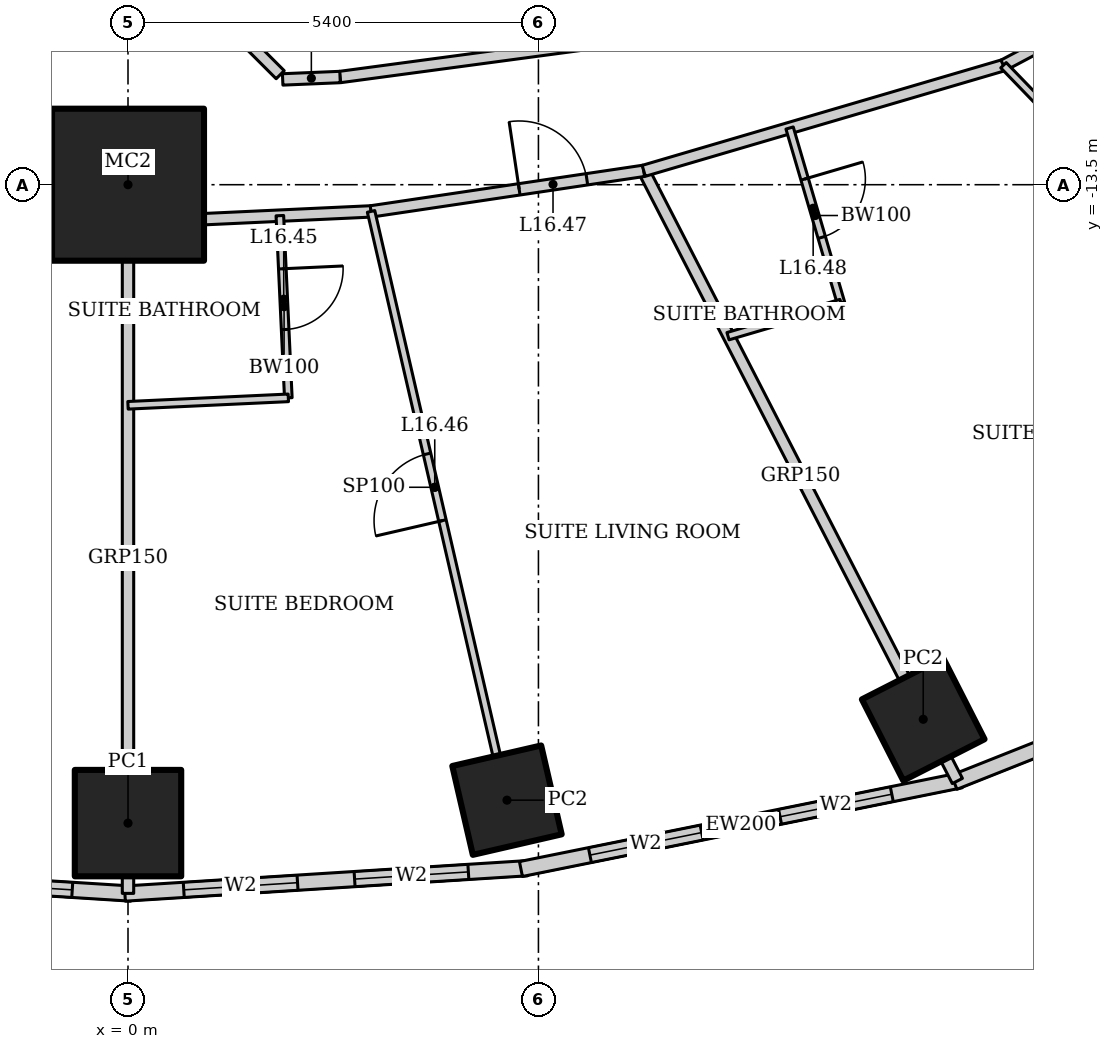
"""IFC4 building model, lengths in metres.
Left out: names, types, materials, properties, quantities, classifications, styles, units other than length and angle.
Written with IfcOpenShell. Run it as: python <this file> out.ifc"""

import sys

from ifc_helpers import new_model, si_unit, direction, frame, frame_2d, origin, origin_2d, place, context, subcontext, project, spatial, rectangle, hollow_rectangle, extrude, element, fill, save


model = new_model("IFC4")
c1 = context("Model", 3, precision=1e-05, world=origin(), true_north=direction((0.0, 1.0)))
c2 = subcontext(c1, "Body", "Model", "MODEL_VIEW")
j1 = project(units=[si_unit("LENGTHUNIT", "METRE"), si_unit("PLANEANGLEUNIT", "RADIAN")], contexts=[c1])
p1 = place(None, origin())
s1 = spatial("IfcSite", under=j1, at=p1, CompositionType="ELEMENT")
p2 = place(p1, origin())
s2 = spatial("IfcBuilding", under=s1, at=p2, CompositionType="ELEMENT")
p3 = place(p2, frame((0.0, 0.0, 73.0)))
s3 = spatial("IfcBuildingStorey", under=s2, at=p3, CompositionType="ELEMENT", Elevation=73.0)
p4 = place(p3, frame((0.0, -13.5, 0.0), z_axis=(0.0, 0.0, 1.0), x_axis=(1.0, 0.0, 0.0)))
e1 = element("IfcColumn", 1, at=p4, inside=s3, PredefinedType="COLUMN", context=c2, shape_type="SweptSolid", body=[
    extrude(hollow_rectangle(XDim=2.0, YDim=2.0, WallThickness=0.17, at=origin_2d()), origin(), (0.0, 0.0, 1.0), 3.6),
])
p5 = place(p3, frame((0.0, -21.9, 0.0), z_axis=(0.0, 0.0, 1.0), x_axis=(1.0, 0.0, 0.0)))
e2 = element("IfcColumn", 2, at=p5, inside=s3, PredefinedType="COLUMN", context=c2, shape_type="SweptSolid", body=[
    extrude(hollow_rectangle(XDim=1.4, YDim=1.4, WallThickness=0.1, at=origin_2d()), origin(), (0.0, 0.0, 1.0), 3.6),
])
for number, where, z_axis, x_axis in (
    (3, (4.986, -21.598, 0.0), (0.0, 0.0, 1.0), (0.974, 0.225, 0.0)),
    (4, (10.463, -20.534, 0.0), (0.0, 0.0, 1.0), (0.891, 0.454, 0.0)),
):
    element("IfcColumn", number, at=place(p3, frame(where, z_axis=z_axis, x_axis=x_axis)), inside=s3, PredefinedType="COLUMN", context=c2, shape_type="SweptSolid", body=[
        extrude(hollow_rectangle(XDim=1.2, YDim=1.2, WallThickness=0.1, at=origin_2d()), origin(), (0.0, 0.0, 1.0), 3.6),
    ])
p6 = place(p3, frame((-5.253, -22.493, 0.0), z_axis=(0.0, 0.0, 1.0), x_axis=(0.998018582375, -0.062919863585, 0.0)))
e5 = element("IfcWall", 5, at=p6, inside=s3, PredefinedType="SOLIDWALL", context=c2, shape_type="SweptSolid", body=[
    extrude(rectangle(XDim=5.304, YDim=0.2, at=frame_2d((2.652, 0.0))), origin(), (0.0, 0.0, 1.0), 3.45),
])
p7 = place(p6, frame((0.776, 0.0, 0.5)))
e6 = element("IfcOpeningElement", 6, at=p7, cuts=e5, PredefinedType="OPENING", context=c2, shape_type="SweptSolid", body=[
    extrude(rectangle(XDim=1.5, YDim=2.2, at=frame_2d((0.75, 1.1))), frame((0.0, 0.11, 0.0), z_axis=(0.0, -1.0, 0.0), x_axis=(1.0, 0.0, 0.0)), (0.0, 0.0, 1.0), 0.22),
])
p8 = place(p6, frame((3.028, 0.0, 0.5)))
e7 = element("IfcOpeningElement", 7, at=p8, cuts=e5, PredefinedType="OPENING", context=c2, shape_type="SweptSolid", body=[
    extrude(rectangle(XDim=1.5, YDim=2.2, at=frame_2d((0.75, 1.1))), frame((0.0, 0.11, 0.0), z_axis=(0.0, -1.0, 0.0), x_axis=(1.0, 0.0, 0.0)), (0.0, 0.0, 1.0), 0.22),
])
p9 = place(p3, frame((-0.041, -22.827, 0.0), z_axis=(0.0, 0.0, 1.0), x_axis=(0.998018582375, 0.062919863585, 0.0)))
e8 = element("IfcWall", 8, at=p9, inside=s3, PredefinedType="SOLIDWALL", context=c2, shape_type="SweptSolid", body=[
    extrude(rectangle(XDim=5.304, YDim=0.2, at=frame_2d((2.652, 0.0))), origin(), (0.0, 0.0, 1.0), 3.45),
])
p10 = place(p9, frame((0.776, 0.0, 0.5)))
e9 = element("IfcOpeningElement", 9, at=p10, cuts=e8, PredefinedType="OPENING", context=c2, shape_type="SweptSolid", body=[
    extrude(rectangle(XDim=1.5, YDim=2.2, at=frame_2d((0.75, 1.1))), frame((0.0, 0.11, 0.0), z_axis=(0.0, -1.0, 0.0), x_axis=(1.0, 0.0, 0.0)), (0.0, 0.0, 1.0), 0.22),
])
p11 = place(p9, frame((3.028, 0.0, 0.5)))
e10 = element("IfcOpeningElement", 10, at=p11, cuts=e8, PredefinedType="OPENING", context=c2, shape_type="SweptSolid", body=[
    extrude(rectangle(XDim=1.5, YDim=2.2, at=frame_2d((0.75, 1.1))), frame((0.0, 0.11, 0.0), z_axis=(0.0, -1.0, 0.0), x_axis=(1.0, 0.0, 0.0)), (0.0, 0.0, 1.0), 0.22),
])
p12 = place(p3, frame((5.17, -22.504, 0.0), z_axis=(0.0, 0.0, 1.0), x_axis=(0.980251657452, 0.197754110105, 0.0)))
e11 = element("IfcWall", 11, at=p12, inside=s3, PredefinedType="SOLIDWALL", context=c2, shape_type="SweptSolid", body=[
    extrude(rectangle(XDim=5.904, YDim=0.2, at=frame_2d((2.952, 0.0))), origin(), (0.0, 0.0, 1.0), 3.45),
])
p13 = place(p12, frame((0.926, 0.0, 0.5)))
e12 = element("IfcOpeningElement", 12, at=p13, cuts=e11, PredefinedType="OPENING", context=c2, shape_type="SweptSolid", body=[
    extrude(rectangle(XDim=1.5, YDim=2.2, at=frame_2d((0.75, 1.1))), frame((0.0, 0.11, 0.0), z_axis=(0.0, -1.0, 0.0), x_axis=(1.0, 0.0, 0.0)), (0.0, 0.0, 1.0), 0.22),
])
p14 = place(p12, frame((3.478, 0.0, 0.5)))
e13 = element("IfcOpeningElement", 13, at=p14, cuts=e11, PredefinedType="OPENING", context=c2, shape_type="SweptSolid", body=[
    extrude(rectangle(XDim=1.5, YDim=2.2, at=frame_2d((0.75, 1.1))), frame((0.0, 0.11, 0.0), z_axis=(0.0, -1.0, 0.0), x_axis=(1.0, 0.0, 0.0)), (0.0, 0.0, 1.0), 0.22),
])
p15 = place(p3, frame((10.869, -21.363, 0.0), z_axis=(0.0, 0.0, 1.0), x_axis=(0.929358351251, 0.369178892895, 0.0)))
e14 = element("IfcWall", 14, at=p15, inside=s3, PredefinedType="SOLIDWALL", context=c2, shape_type="SweptSolid", body=[
    extrude(rectangle(XDim=7.692, YDim=0.2, at=frame_2d((3.846, 0.0))), origin(), (0.0, 0.0, 1.0), 3.45),
])
p16 = place(p15, frame((1.373, 0.0, 0.5)))
e15 = element("IfcOpeningElement", 15, at=p16, cuts=e14, PredefinedType="OPENING", context=c2, shape_type="SweptSolid", body=[
    extrude(rectangle(XDim=1.5, YDim=2.2, at=frame_2d((0.75, 1.1))), frame((0.0, 0.11, 0.0), z_axis=(0.0, -1.0, 0.0), x_axis=(1.0, 0.0, 0.0)), (0.0, 0.0, 1.0), 0.22),
])
p17 = place(p15, frame((4.819, 0.0, 0.5)))
e16 = element("IfcOpeningElement", 16, at=p17, cuts=e14, PredefinedType="OPENING", context=c2, shape_type="SweptSolid", body=[
    extrude(rectangle(XDim=1.5, YDim=2.2, at=frame_2d((0.75, 1.1))), frame((0.0, 0.11, 0.0), z_axis=(0.0, -1.0, 0.0), x_axis=(1.0, 0.0, 0.0)), (0.0, 0.0, 1.0), 0.22),
])
p18 = place(p3, frame((0.0, -22.825, 0.0), z_axis=(0.0, 0.0, 1.0), x_axis=(0.0, 1.0, 0.0)))
e17 = element("IfcWall", 17, at=p18, inside=s3, PredefinedType="PARTITIONING", context=c2, shape_type="SweptSolid", body=[
    extrude(rectangle(XDim=8.825, YDim=0.15, at=frame_2d((4.412, 0.0))), origin(), (0.0, 0.0, 1.0), 2.924),
])
p19 = place(p3, frame((10.912, -21.346, 0.0), z_axis=(0.0, 0.0, 1.0), x_axis=(-0.457117602022, 0.889406261458, 0.0)))
e18 = element("IfcWall", 18, at=p19, inside=s3, PredefinedType="PARTITIONING", context=c2, shape_type="SweptSolid", body=[
    extrude(rectangle(XDim=9.027, YDim=0.15, at=frame_2d((4.513, 0.0))), origin(), (0.0, 0.0, 1.0), 2.528),
])
p20 = place(p3, frame((-3.198, -13.851, 0.0), z_axis=(0.0, 0.0, 1.0), x_axis=(0.998920826789, -0.046445471333, 0.0)))
e19 = element("IfcWall", 19, at=p20, inside=s3, PredefinedType="PARTITIONING", context=c2, shape_type="SweptSolid", body=[
    extrude(rectangle(XDim=3.201, YDim=0.15, at=frame_2d((1.601, 0.0))), origin(), (0.0, 0.0, 1.0), 3.45),
])
p21 = place(p20, frame((0.15, 0.0, 0.0)))
e20 = element("IfcOpeningElement", 20, at=p21, cuts=e19, PredefinedType="OPENING", context=c2, shape_type="SweptSolid", body=[
    extrude(rectangle(XDim=0.9, YDim=2.1, at=frame_2d((0.45, 1.05))), frame((0.0, 0.085, 0.0), z_axis=(0.0, -1.0, 0.0), x_axis=(1.0, 0.0, 0.0)), (0.0, 0.0, 1.0), 0.17),
])
p22 = place(p3, frame((0.0, -14.0, 0.0), z_axis=(0.0, 0.0, 1.0), x_axis=(0.998920826789, 0.046445471333, 0.0)))
e21 = element("IfcWall", 21, at=p22, inside=s3, PredefinedType="PARTITIONING", context=c2, shape_type="SweptSolid", body=[
    extrude(rectangle(XDim=3.201, YDim=0.15, at=frame_2d((1.601, 0.0))), origin(), (0.0, 0.0, 1.0), 3.45),
])
p23 = place(p3, frame((3.198, -13.851, 0.0), z_axis=(0.0, 0.0, 1.0), x_axis=(0.989107488999, 0.14719502439, 0.0)))
e22 = element("IfcWall", 22, at=p23, inside=s3, PredefinedType="PARTITIONING", context=c2, shape_type="SweptSolid", body=[
    extrude(rectangle(XDim=3.627, YDim=0.15, at=frame_2d((1.814, 0.0))), origin(), (0.0, 0.0, 1.0), 3.45),
])
p24 = place(p23, frame((1.97, 0.0, 0.0)))
e23 = element("IfcOpeningElement", 23, at=p24, cuts=e22, PredefinedType="OPENING", context=c2, shape_type="SweptSolid", body=[
    extrude(rectangle(XDim=0.9, YDim=2.1, at=frame_2d((0.45, 1.05))), frame((0.0, 0.085, 0.0), z_axis=(0.0, -1.0, 0.0), x_axis=(1.0, 0.0, 0.0)), (0.0, 0.0, 1.0), 0.17),
])
p25 = place(p3, frame((6.786, -13.317, 0.0), z_axis=(0.0, 0.0, 1.0), x_axis=(0.959496227294, 0.281721475589, 0.0)))
e24 = element("IfcWall", 24, at=p25, inside=s3, PredefinedType="PARTITIONING", context=c2, shape_type="SweptSolid", body=[
    extrude(rectangle(XDim=4.933, YDim=0.15, at=frame_2d((2.466, 0.0))), origin(), (0.0, 0.0, 1.0), 3.45),
])
p26 = place(p3, frame((11.519, -11.928, 0.0), z_axis=(0.0, 0.0, 1.0), x_axis=(0.883334368785, 0.468743419071, 0.0)))
e25 = element("IfcWall", 25, at=p26, inside=s3, PredefinedType="PARTITIONING", context=c2, shape_type="SweptSolid", body=[
    extrude(rectangle(XDim=5.491, YDim=0.15, at=frame_2d((2.746, 0.0))), origin(), (0.0, 0.0, 1.0), 3.45),
])
p27 = place(p3, frame((2.79, -12.083, 0.0), z_axis=(0.0, 0.0, 1.0), x_axis=(0.991129053928, 0.13290296633, 0.0)))
e26 = element("IfcWall", 26, at=p27, inside=s3, PredefinedType="PARTITIONING", context=c2, shape_type="SweptSolid", body=[
    extrude(rectangle(XDim=3.18, YDim=0.15, at=frame_2d((1.59, 0.0))), origin(), (0.0, 0.0, 1.0), 3.45),
])
p28 = place(p3, frame((1.998, -13.907, 0.0), z_axis=(0.0, 0.0, 1.0), x_axis=(0.046492089498, -0.998918658157, 0.0)))
e27 = element("IfcWall", 27, at=p28, inside=s3, PredefinedType="PARTITIONING", context=c2, shape_type="SweptSolid", body=[
    extrude(rectangle(XDim=2.4, YDim=0.1, at=frame_2d((1.2, 0.0))), origin(), (0.0, 0.0, 1.0), 2.749),
])
p29 = place(p28, frame((0.7, 0.0, 0.0)))
e28 = element("IfcOpeningElement", 28, at=p29, cuts=e27, PredefinedType="OPENING", context=c2, shape_type="SweptSolid", body=[
    extrude(rectangle(XDim=0.8, YDim=2.1, at=frame_2d((0.4, 1.05))), frame((0.0, 0.06, 0.0), z_axis=(0.0, -1.0, 0.0), x_axis=(1.0, 0.0, 0.0)), (0.0, 0.0, 1.0), 0.12),
])
p30 = place(p3, frame((2.109, -16.304, 0.0), z_axis=(0.0, 0.0, 1.0), x_axis=(-0.998919337223, -0.04647749694, 0.0)))
e29 = element("IfcWall", 29, at=p30, inside=s3, PredefinedType="PARTITIONING", context=c2, shape_type="SweptSolid", body=[
    extrude(rectangle(XDim=2.112, YDim=0.1, at=frame_2d((1.056, 0.0))), origin(), (0.0, 0.0, 1.0), 3.45),
])
p31 = place(p3, frame((4.874, -21.111, 0.0), z_axis=(0.0, 0.0, 1.0), x_axis=(-0.224955233595, 0.97436909992, 0.0)))
e30 = element("IfcWall", 30, at=p31, inside=s3, PredefinedType="PARTITIONING", context=c2, shape_type="SweptSolid", body=[
    extrude(rectangle(XDim=7.45, YDim=0.1, at=frame_2d((3.725, 0.0))), origin(), (0.0, 0.0, 1.0), 2.767),
])
p32 = place(p31, frame((3.275, 0.0, 0.0)))
e31 = element("IfcOpeningElement", 31, at=p32, cuts=e30, PredefinedType="OPENING", context=c2, shape_type="SweptSolid", body=[
    extrude(rectangle(XDim=0.9, YDim=2.1, at=frame_2d((0.45, 1.05))), frame((0.0, 0.06, 0.0), z_axis=(0.0, -1.0, 0.0), x_axis=(1.0, 0.0, 0.0)), (0.0, 0.0, 1.0), 0.12),
])
p33 = place(p3, frame((8.705, -12.754, 0.0), z_axis=(0.0, 0.0, 1.0), x_axis=(0.281659633817, -0.959514382736, 0.0)))
e32 = element("IfcWall", 32, at=p33, inside=s3, PredefinedType="PARTITIONING", context=c2, shape_type="SweptSolid", body=[
    extrude(rectangle(XDim=2.4, YDim=0.1, at=frame_2d((1.2, 0.0))), origin(), (0.0, 0.0, 1.0), 3.45),
])
p34 = place(p33, frame((0.7, 0.0, 0.0)))
e33 = element("IfcOpeningElement", 33, at=p34, cuts=e32, PredefinedType="OPENING", context=c2, shape_type="SweptSolid", body=[
    extrude(rectangle(XDim=0.8, YDim=2.1, at=frame_2d((0.4, 1.05))), frame((0.0, 0.06, 0.0), z_axis=(0.0, -1.0, 0.0), x_axis=(1.0, 0.0, 0.0)), (0.0, 0.0, 1.0), 0.12),
])
p35 = place(p3, frame((9.381, -15.057, 0.0), z_axis=(0.0, 0.0, 1.0), x_axis=(-0.959518451093, -0.281645773999, 0.0)))
e34 = element("IfcWall", 34, at=p35, inside=s3, PredefinedType="PARTITIONING", context=c2, shape_type="SweptSolid", body=[
    extrude(rectangle(XDim=1.549, YDim=0.1, at=frame_2d((0.774, 0.0))), origin(), (0.0, 0.0, 1.0), 3.45),
])
p36 = place(p3, frame((16.944, -17.545, 0.0), z_axis=(0.0, 0.0, 1.0), x_axis=(-0.694666479492, 0.719331969448, 0.0)))
e35 = element("IfcWall", 35, at=p36, inside=s3, PredefinedType="PARTITIONING", context=c2, shape_type="SweptSolid", body=[
    extrude(rectangle(XDim=7.81, YDim=0.1, at=frame_2d((3.905, 0.0))), origin(), (0.0, 0.0, 1.0), 2.528),
])
p37 = place(p36, frame((3.455, 0.0, 0.0)))
e36 = element("IfcOpeningElement", 36, at=p37, cuts=e35, PredefinedType="OPENING", context=c2, shape_type="SweptSolid", body=[
    extrude(rectangle(XDim=0.9, YDim=2.1, at=frame_2d((0.45, 1.05))), frame((0.0, 0.06, 0.0), z_axis=(0.0, -1.0, 0.0), x_axis=(1.0, 0.0, 0.0)), (0.0, 0.0, 1.0), 0.12),
])
p38 = place(p3, frame((2.035, -12.115, 0.0), z_axis=(0.0, 0.0, 1.0), x_axis=(0.999116751279, 0.042020439232, 0.0)))
e37 = element("IfcWall", 37, at=p38, inside=s3, PredefinedType="PARTITIONING", context=c2, shape_type="SweptSolid", body=[
    extrude(rectangle(XDim=0.755, YDim=0.15, at=frame_2d((0.378, 0.0))), origin(), (0.0, 0.0, 1.0), 3.45),
])
p39 = place(p3, frame((1.425, -11.475, 0.0), z_axis=(0.0, 0.0, 1.0), x_axis=(0.707256164678, -0.706957366129, 0.0)))
e38 = element("IfcWall", 38, at=p39, inside=s3, PredefinedType="PARTITIONING", context=c2, shape_type="SweptSolid", body=[
    extrude(rectangle(XDim=0.817, YDim=0.15, at=frame_2d((0.409, 0.0))), origin(), (0.0, 0.0, 1.0), 3.45),
])
p40 = place(p8, origin())
e39 = element("IfcWindow", 39, at=p40, inside=s3, PartitioningType="SINGLE_PANEL", PredefinedType="WINDOW", context=c2, shape_type="SweptSolid", body=[
    extrude(rectangle(XDim=1.5, YDim=2.2, at=frame_2d((0.75, 1.1))), frame((0.0, 0.03, 0.0), z_axis=(0.0, -1.0, 0.0), x_axis=(1.0, 0.0, 0.0)), (0.0, 0.0, 1.0), 0.06),
])
fill(e7, e39)
p41 = place(p10, origin())
e40 = element("IfcWindow", 40, at=p41, inside=s3, PartitioningType="SINGLE_PANEL", PredefinedType="WINDOW", context=c2, shape_type="SweptSolid", body=[
    extrude(rectangle(XDim=1.5, YDim=2.2, at=frame_2d((0.75, 1.1))), frame((0.0, 0.03, 0.0), z_axis=(0.0, -1.0, 0.0), x_axis=(1.0, 0.0, 0.0)), (0.0, 0.0, 1.0), 0.06),
])
fill(e9, e40)
p42 = place(p11, origin())
e41 = element("IfcWindow", 41, at=p42, inside=s3, PartitioningType="SINGLE_PANEL", PredefinedType="WINDOW", context=c2, shape_type="SweptSolid", body=[
    extrude(rectangle(XDim=1.5, YDim=2.2, at=frame_2d((0.75, 1.1))), frame((0.0, 0.03, 0.0), z_axis=(0.0, -1.0, 0.0), x_axis=(1.0, 0.0, 0.0)), (0.0, 0.0, 1.0), 0.06),
])
fill(e10, e41)
p43 = place(p13, origin())
e42 = element("IfcWindow", 42, at=p43, inside=s3, PartitioningType="SINGLE_PANEL", PredefinedType="WINDOW", context=c2, shape_type="SweptSolid", body=[
    extrude(rectangle(XDim=1.5, YDim=2.2, at=frame_2d((0.75, 1.1))), frame((0.0, 0.03, 0.0), z_axis=(0.0, -1.0, 0.0), x_axis=(1.0, 0.0, 0.0)), (0.0, 0.0, 1.0), 0.06),
])
fill(e12, e42)
p44 = place(p14, origin())
e43 = element("IfcWindow", 43, at=p44, inside=s3, PartitioningType="SINGLE_PANEL", PredefinedType="WINDOW", context=c2, shape_type="SweptSolid", body=[
    extrude(rectangle(XDim=1.5, YDim=2.2, at=frame_2d((0.75, 1.1))), frame((0.0, 0.03, 0.0), z_axis=(0.0, -1.0, 0.0), x_axis=(1.0, 0.0, 0.0)), (0.0, 0.0, 1.0), 0.06),
])
fill(e13, e43)
p45 = place(p29, origin())
e44 = element("IfcDoor", 44, at=p45, inside=s3, OperationType="SINGLE_SWING_LEFT", PredefinedType="DOOR", context=c2, shape_type="SweptSolid", body=[
    extrude(rectangle(XDim=0.8, YDim=2.1, at=frame_2d((0.4, 1.05))), frame((0.0, 0.025, 0.0), z_axis=(0.0, -1.0, 0.0), x_axis=(1.0, 0.0, 0.0)), (0.0, 0.0, 1.0), 0.05),
])
fill(e28, e44)
p46 = place(p32, origin())
e45 = element("IfcDoor", 45, at=p46, inside=s3, OperationType="SINGLE_SWING_LEFT", PredefinedType="DOOR", context=c2, shape_type="SweptSolid", body=[
    extrude(rectangle(XDim=0.9, YDim=2.1, at=frame_2d((0.45, 1.05))), frame((0.0, 0.025, 0.0), z_axis=(0.0, -1.0, 0.0), x_axis=(1.0, 0.0, 0.0)), (0.0, 0.0, 1.0), 0.05),
])
fill(e31, e45)
p47 = place(p24, origin())
e46 = element("IfcDoor", 46, at=p47, inside=s3, OperationType="SINGLE_SWING_LEFT", PredefinedType="DOOR", context=c2, shape_type="SweptSolid", body=[
    extrude(rectangle(XDim=0.9, YDim=2.1, at=frame_2d((0.45, 1.05))), frame((0.0, 0.025, 0.0), z_axis=(0.0, -1.0, 0.0), x_axis=(1.0, 0.0, 0.0)), (0.0, 0.0, 1.0), 0.05),
])
fill(e23, e46)
p48 = place(p34, origin())
e47 = element("IfcDoor", 47, at=p48, inside=s3, OperationType="SINGLE_SWING_LEFT", PredefinedType="DOOR", context=c2, shape_type="SweptSolid", body=[
    extrude(rectangle(XDim=0.8, YDim=2.1, at=frame_2d((0.4, 1.05))), frame((0.0, 0.025, 0.0), z_axis=(0.0, -1.0, 0.0), x_axis=(1.0, 0.0, 0.0)), (0.0, 0.0, 1.0), 0.05),
])
fill(e33, e47)
save(model, sys.argv[1])
